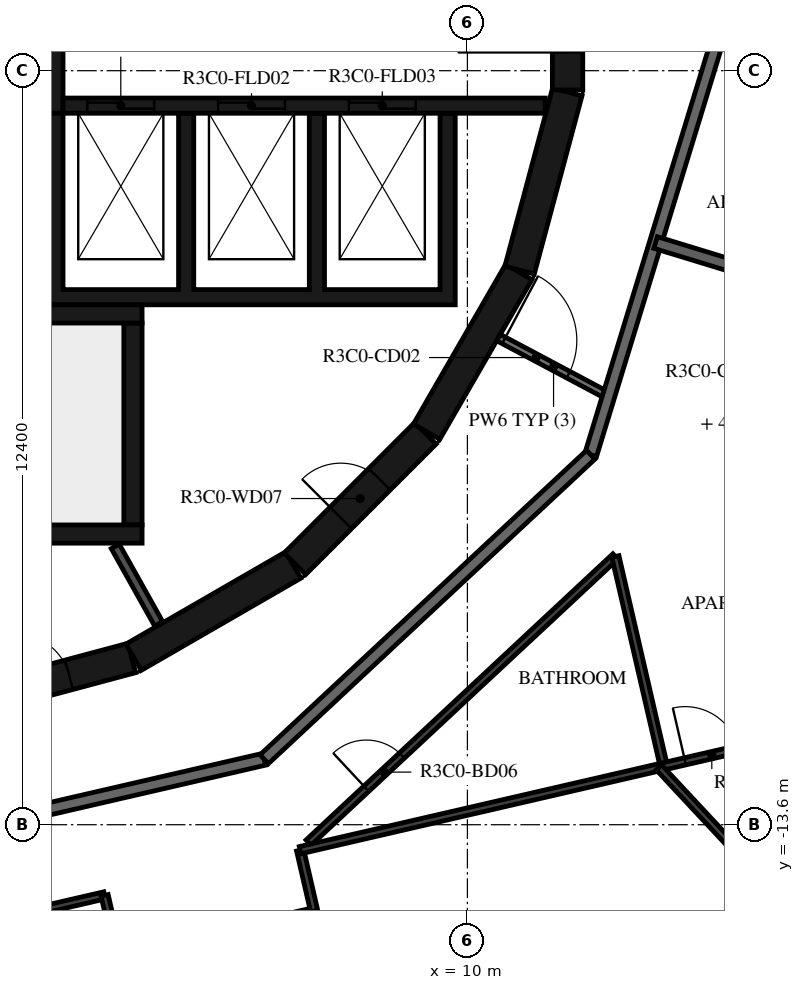
"""IFC4 building model, lengths in metres.
Left out: names, types, materials, properties, quantities, classifications, styles, units other than length and angle.
Written with IfcOpenShell. Run it as: python <this file> out.ifc"""

import sys

from ifc_helpers import new_model, si_unit, direction, frame, frame_2d, origin, place, context, subcontext, project, spatial, polyline, rectangle, outline, extrude, element, fill, save


model = new_model("IFC4")
c1 = context("Model", 3, precision=1e-05, world=origin(), true_north=direction((0.0, 1.0)))
c2 = subcontext(c1, "Body", "Model", "MODEL_VIEW")
j1 = project(units=[si_unit("LENGTHUNIT", "METRE"), si_unit("PLANEANGLEUNIT", "RADIAN")], contexts=[c1])
p1 = place(None, origin())
s1 = spatial("IfcSite", under=j1, at=p1, CompositionType="ELEMENT")
p2 = place(p1, origin())
s2 = spatial("IfcBuilding", under=s1, at=p2, CompositionType="ELEMENT")
p3 = place(p2, frame((0.0, 0.0, 141.4)))
s3 = spatial("IfcBuildingStorey", under=s2, at=p3, CompositionType="ELEMENT", Elevation=141.4)
p4 = place(p3, frame((1.55, -11.643, 0.0), z_axis=(0.0, 0.0, 1.0), x_axis=(0.965948410781, 0.258734743916, 0.0)))
e1 = element("IfcWall", 1, at=p4, inside=s3, PredefinedType="SHEAR", context=c2, shape_type="SweptSolid", body=[
    extrude(rectangle(XDim=3.033, YDim=0.5, at=frame_2d((1.516, 0.0))), origin(), (0.0, 0.0, 1.0), 3.05),
])
p5 = place(p4, frame((1.066, 0.0, 0.0)))
e2 = element("IfcOpeningElement", 2, at=p5, cuts=e1, PredefinedType="OPENING", context=c2, shape_type="SweptSolid", body=[
    extrude(rectangle(XDim=0.9, YDim=2.1, at=frame_2d((0.45, 1.05))), frame((0.0, 0.26, 0.0), z_axis=(0.0, -1.0, 0.0), x_axis=(1.0, 0.0, 0.0)), (0.0, 0.0, 1.0), 0.52),
])
p6 = place(p3, frame((4.51, -10.845, 0.0), z_axis=(0.0, 0.0, 1.0), x_axis=(0.865975092491, 0.500087131594, 0.0)))
e3 = element("IfcWall", 3, at=p6, inside=s3, PredefinedType="SHEAR", context=c2, shape_type="SweptSolid", body=[
    extrude(rectangle(XDim=3.033, YDim=0.5, at=frame_2d((1.516, 0.0))), origin(), (0.0, 0.0, 1.0), 3.05),
])
p7 = place(p3, frame((7.164, -9.308, 0.0), z_axis=(0.0, 0.0, 1.0), x_axis=(0.707106781187, 0.707106781187, 0.0)))
e4 = element("IfcWall", 4, at=p7, inside=s3, PredefinedType="SHEAR", context=c2, shape_type="SweptSolid", body=[
    extrude(rectangle(XDim=3.032, YDim=0.5, at=frame_2d((1.516, 0.0))), origin(), (0.0, 0.0, 1.0), 3.05),
])
p8 = place(p7, frame((1.066, 0.0, 0.0)))
e5 = element("IfcOpeningElement", 5, at=p8, cuts=e4, PredefinedType="OPENING", context=c2, shape_type="SweptSolid", body=[
    extrude(rectangle(XDim=0.9, YDim=2.1, at=frame_2d((0.45, 1.05))), frame((0.0, 0.26, 0.0), z_axis=(0.0, -1.0, 0.0), x_axis=(1.0, 0.0, 0.0)), (0.0, 0.0, 1.0), 0.52),
])
for number, where, z_axis, x_axis in (
    (6, (9.329, -7.137, 0.0), (0.0, 0.0, 1.0), (0.5, 0.866, 0.0)),
    (7, (10.858, -4.479, 0.0), (0.0, 0.0, 1.0), (0.259, 0.966, 0.0)),
):
    element("IfcWall", number, at=place(p3, frame(where, z_axis=z_axis, x_axis=x_axis)), inside=s3, PredefinedType="SHEAR", context=c2, shape_type="SweptSolid", body=[
        extrude(rectangle(XDim=3.033, YDim=0.5, at=frame_2d((1.516, 0.0))), origin(), (0.0, 0.0, 1.0), 3.05),
    ])
p9 = place(p3, frame((11.647, -1.516, 0.0), z_axis=(0.0, 0.0, 1.0), x_axis=(0.0, 1.0, 0.0)))
e8 = element("IfcWall", 8, at=p9, inside=s3, PredefinedType="SHEAR", context=c2, shape_type="SweptSolid", body=[
    extrude(rectangle(XDim=3.033, YDim=0.5, at=frame_2d((1.516, 0.0))), origin(), (0.0, 0.0, 1.0), 3.05),
])
p10 = place(p9, frame((0.616, 0.0, 0.0)))
e9 = element("IfcOpeningElement", 9, at=p10, cuts=e8, PredefinedType="OPENING", context=c2, shape_type="SweptSolid", body=[
    extrude(rectangle(XDim=1.8, YDim=2.1, at=frame_2d((0.9, 1.05))), frame((0.0, 0.26, 0.0), z_axis=(0.0, -1.0, 0.0), x_axis=(1.0, 0.0, 0.0)), (0.0, 0.0, 1.0), 0.52),
])
p11 = place(p3, frame((-2.4, -5.2, 0.0), z_axis=(0.0, 0.0, 1.0), x_axis=(1.0, 0.0, 0.0)))
e10 = element("IfcWall", 10, at=p11, inside=s3, PredefinedType="SHEAR", context=c2, shape_type="SweptSolid", body=[
    extrude(rectangle(XDim=7.05, YDim=0.3, at=frame_2d((3.525, 0.0))), origin(), (0.0, 0.0, 1.0), 3.05),
])
p12 = place(p3, frame((4.5, -8.67, 0.0), z_axis=(0.0, 0.0, 1.0), x_axis=(0.0, 1.0, 0.0)))
e11 = element("IfcWall", 11, at=p12, inside=s3, PredefinedType="SHEAR", context=c2, shape_type="SweptSolid", body=[
    extrude(rectangle(XDim=3.32, YDim=0.3, at=frame_2d((1.66, 0.0))), origin(), (0.0, 0.0, 1.0), 3.05),
])
p13 = place(p3, frame((0.1, -8.82, 0.0), z_axis=(0.0, 0.0, 1.0), x_axis=(1.0, 0.0, 0.0)))
e12 = element("IfcWall", 12, at=p13, inside=s3, PredefinedType="SHEAR", context=c2, shape_type="SweptSolid", body=[
    extrude(rectangle(XDim=4.55, YDim=0.3, at=frame_2d((2.275, 0.0))), origin(), (0.0, 0.0, 1.0), 3.05),
])
p14 = place(p3, origin())
e13 = element("IfcWall", 13, at=p14, inside=s3, PredefinedType="SHEAR", context=c2, shape_type="SweptSolid", body=[
    extrude(outline(polyline([(9.8, -5.05), (9.8, -4.8), (9.8, -1.9), (9.55, -1.9), (9.55, -4.8), (7.65, -4.8), (7.65, -1.9), (7.4, -1.9), (7.4, -4.8), (5.5, -4.8), (5.5, -1.9), (5.25, -1.9), (5.25, -4.8), (3.35, -4.8), (3.35, -1.9), (3.1, -1.9), (3.1, -4.8), (-5.25, -4.8), (-5.25, -1.9), (-5.5, -1.9), (-5.5, -4.8), (-7.4, -4.8), (-7.4, -1.9), (-7.65, -1.9), (-7.65, -4.8), (-9.55, -4.8), (-9.55, -1.9), (-9.8, -1.9), (-9.8, -4.8), (-9.8, -5.05), (9.8, -5.05)])), origin(), (0.0, 0.0, 1.0), 3.05),
])
p15 = place(p3, frame((3.35, -1.775, 0.0), z_axis=(0.0, 0.0, 1.0), x_axis=(1.0, 0.0, 0.0)))
e14 = element("IfcWall", 14, at=p15, inside=s3, PredefinedType="SHEAR", context=c2, shape_type="SweptSolid", body=[
    extrude(rectangle(XDim=7.93, YDim=0.25, at=frame_2d((3.965, 0.0))), origin(), (0.0, 0.0, 1.0), 3.05),
])
p16 = place(p15, frame((0.4, 0.0, 0.0)))
e15 = element("IfcOpeningElement", 15, at=p16, cuts=e14, PredefinedType="OPENING", context=c2, shape_type="SweptSolid", body=[
    extrude(rectangle(XDim=1.1, YDim=2.4, at=frame_2d((0.55, 1.2))), frame((0.0, 0.135, 0.0), z_axis=(0.0, -1.0, 0.0), x_axis=(1.0, 0.0, 0.0)), (0.0, 0.0, 1.0), 0.27),
])
p17 = place(p15, frame((2.55, 0.0, 0.0)))
e16 = element("IfcOpeningElement", 16, at=p17, cuts=e14, PredefinedType="OPENING", context=c2, shape_type="SweptSolid", body=[
    extrude(rectangle(XDim=1.1, YDim=2.4, at=frame_2d((0.55, 1.2))), frame((0.0, 0.135, 0.0), z_axis=(0.0, -1.0, 0.0), x_axis=(1.0, 0.0, 0.0)), (0.0, 0.0, 1.0), 0.27),
])
p18 = place(p15, frame((4.7, 0.0, 0.0)))
e17 = element("IfcOpeningElement", 17, at=p18, cuts=e14, PredefinedType="OPENING", context=c2, shape_type="SweptSolid", body=[
    extrude(rectangle(XDim=1.1, YDim=2.4, at=frame_2d((0.55, 1.2))), frame((0.0, 0.135, 0.0), z_axis=(0.0, -1.0, 0.0), x_axis=(1.0, 0.0, 0.0)), (0.0, 0.0, 1.0), 0.27),
])
p19 = place(p3, frame((3.225, -1.9, 0.0), z_axis=(0.0, 0.0, 1.0), x_axis=(0.0, 1.0, 0.0)))
e18 = element("IfcWall", 18, at=p19, inside=s3, PredefinedType="SHEAR", context=c2, shape_type="SweptSolid", body=[
    extrude(rectangle(XDim=3.8, YDim=0.25, at=frame_2d((1.9, 0.0))), origin(), (0.0, 0.0, 1.0), 3.05),
])
p20 = place(p3, frame((4.922, -10.296, 0.0), z_axis=(0.0, 0.0, 1.0), x_axis=(-0.48860846254, 0.872503163509, 0.0)))
e19 = element("IfcWall", 19, at=p20, inside=s3, PredefinedType="PARTITIONING", context=c2, shape_type="SweptSolid", body=[
    extrude(rectangle(XDim=1.459, YDim=0.15, at=frame_2d((0.73, 0.0))), origin(), (0.0, 0.0, 1.0), 3.05),
])
p21 = place(p3, frame((10.511, -5.589, 0.0), z_axis=(0.0, 0.0, 1.0), x_axis=(0.882987820808, -0.469395897196, 0.0)))
e20 = element("IfcWall", 20, at=p21, inside=s3, PredefinedType="PARTITIONING", context=c2, shape_type="SweptSolid", body=[
    extrude(rectangle(XDim=2.052, YDim=0.12, at=frame_2d((1.026, 0.0))), origin(), (0.0, 0.0, 1.0), 3.05),
])
p22 = place(p21, frame((0.1, 0.0, 0.0)))
e21 = element("IfcOpeningElement", 21, at=p22, cuts=e20, PredefinedType="OPENING", context=c2, shape_type="SweptSolid", body=[
    extrude(rectangle(XDim=1.2, YDim=2.1, at=frame_2d((0.6, 1.05))), frame((0.0, 0.07, 0.0), z_axis=(0.0, -1.0, 0.0), x_axis=(1.0, 0.0, 0.0)), (0.0, 0.0, 1.0), 0.14),
])
p23 = place(p3, frame((12.028, -7.516, 0.0), z_axis=(0.0, 0.0, 1.0), x_axis=(0.292365533182, 0.956306642771, 0.0)))
e22 = element("IfcWall", 22, at=p23, inside=s3, PredefinedType="STANDARD", context=c2, shape_type="SweptSolid", body=[
    extrude(rectangle(XDim=7.342, YDim=0.2, at=frame_2d((3.671, 0.0))), origin(), (0.0, 0.0, 1.0), 3.05),
])
p24 = place(p3, frame((-0.495, -14.175, 0.0), z_axis=(0.0, 0.0, 1.0), x_axis=(0.974376622151, 0.224922649383, 0.0)))
e23 = element("IfcWall", 23, at=p24, inside=s3, PredefinedType="STANDARD", context=c2, shape_type="SweptSolid", body=[
    extrude(rectangle(XDim=7.342, YDim=0.2, at=frame_2d((3.671, 0.0))), origin(), (0.0, 0.0, 1.0), 3.05),
])
p25 = place(p24, frame((0.2, 0.0, 0.0)))
e24 = element("IfcOpeningElement", 24, at=p25, cuts=e23, PredefinedType="OPENING", context=c2, shape_type="SweptSolid", body=[
    extrude(rectangle(XDim=1.0, YDim=2.1, at=frame_2d((0.5, 1.05))), frame((0.0, 0.11, 0.0), z_axis=(0.0, -1.0, 0.0), x_axis=(1.0, 0.0, 0.0)), (0.0, 0.0, 1.0), 0.22),
])
p26 = place(p3, frame((6.659, -12.523, 0.0), z_axis=(0.0, 0.0, 1.0), x_axis=(0.731350455479, 0.682001841105, 0.0)))
e25 = element("IfcWall", 25, at=p26, inside=s3, PredefinedType="STANDARD", context=c2, shape_type="SweptSolid", body=[
    extrude(rectangle(XDim=7.342, YDim=0.2, at=frame_2d((3.671, 0.0))), origin(), (0.0, 0.0, 1.0), 3.05),
])
p27 = place(p3, frame((13.095, -4.026, 0.0), z_axis=(0.0, 0.0, 1.0), x_axis=(0.956303942966, -0.292374363904, 0.0)))
e26 = element("IfcWall", 26, at=p27, inside=s3, PredefinedType="STANDARD", context=c2, shape_type="SweptSolid", body=[
    extrude(rectangle(XDim=6.567, YDim=0.2, at=frame_2d((3.284, 0.0))), origin(), (0.0, 0.0, 1.0), 3.05),
])
p28 = place(p3, frame((-14.736, -19.095, 0.0), z_axis=(0.0, 0.0, 1.0), x_axis=(0.974368335243, 0.224958545682, 0.0)))
e27 = element("IfcWall", 27, at=p28, inside=s3, PredefinedType="PARTITIONING", context=c2, shape_type="SweptSolid", body=[
    extrude(rectangle(XDim=19.263, YDim=0.12, at=frame_2d((9.632, 0.0))), origin(), (0.0, 0.0, 1.0), 3.05),
])
p29 = place(p28, frame((2.993, 0.0, 0.0)))
e28 = element("IfcOpeningElement", 28, at=p29, cuts=e27, PredefinedType="OPENING", context=c2, shape_type="SweptSolid", body=[
    extrude(rectangle(XDim=0.9, YDim=2.1, at=frame_2d((0.45, 1.05))), frame((0.0, 0.07, 0.0), z_axis=(0.0, -1.0, 0.0), x_axis=(1.0, 0.0, 0.0)), (0.0, 0.0, 1.0), 0.14),
])
p30 = place(p28, frame((6.81, 0.0, 0.0)))
e29 = element("IfcOpeningElement", 29, at=p30, cuts=e27, PredefinedType="OPENING", context=c2, shape_type="SweptSolid", body=[
    extrude(rectangle(XDim=0.9, YDim=2.1, at=frame_2d((0.45, 1.05))), frame((0.0, 0.07, 0.0), z_axis=(0.0, -1.0, 0.0), x_axis=(1.0, 0.0, 0.0)), (0.0, 0.0, 1.0), 0.14),
])
p31 = place(p28, frame((0.2, 0.0, 0.0)))
e30 = element("IfcOpeningElement", 30, at=p31, cuts=e27, PredefinedType="OPENING", context=c2, shape_type="SweptSolid", body=[
    extrude(rectangle(XDim=0.9, YDim=2.1, at=frame_2d((0.45, 1.05))), frame((0.0, 0.07, 0.0), z_axis=(0.0, -1.0, 0.0), x_axis=(1.0, 0.0, 0.0)), (0.0, 0.0, 1.0), 0.14),
])
p32 = place(p28, frame((14.839, 0.0, 0.0)))
e31 = element("IfcOpeningElement", 31, at=p32, cuts=e27, PredefinedType="OPENING", context=c2, shape_type="SweptSolid", body=[
    extrude(rectangle(XDim=0.9, YDim=2.1, at=frame_2d((0.45, 1.05))), frame((0.0, 0.07, 0.0), z_axis=(0.0, -1.0, 0.0), x_axis=(1.0, 0.0, 0.0)), (0.0, 0.0, 1.0), 0.14),
])
p33 = place(p3, frame((4.034, -14.762, 0.0), z_axis=(0.0, 0.0, 1.0), x_axis=(0.224859506699, -0.974391195695, 0.0)))
e32 = element("IfcWall", 32, at=p33, inside=s3, PredefinedType="PARTITIONING", context=c2, shape_type="SweptSolid", body=[
    extrude(rectangle(XDim=1.029, YDim=0.12, at=frame_2d((0.515, 0.0))), origin(), (0.0, 0.0, 1.0), 3.05),
])
p34 = place(p3, frame((4.265, -15.765, 0.0), z_axis=(0.0, 0.0, 1.0), x_axis=(0.974382467056, 0.22489732745, 0.0)))
e33 = element("IfcWall", 33, at=p34, inside=s3, PredefinedType="PARTITIONING", context=c2, shape_type="SweptSolid", body=[
    extrude(rectangle(XDim=3.3, YDim=0.12, at=frame_2d((1.65, 0.0))), origin(), (0.0, 0.0, 1.0), 3.05),
])
p35 = place(p3, frame((7.481, -15.022, 0.0), z_axis=(0.0, 0.0, 1.0), x_axis=(-0.225084689316, 0.974339203068, 0.0)))
e34 = element("IfcWall", 34, at=p35, inside=s3, PredefinedType="PARTITIONING", context=c2, shape_type="SweptSolid", body=[
    extrude(rectangle(XDim=1.029, YDim=0.12, at=frame_2d((0.515, 0.0))), origin(), (0.0, 0.0, 1.0), 3.05),
])
p36 = place(p3, frame((7.388, -13.894, 0.0), z_axis=(0.0, 0.0, 1.0), x_axis=(0.731339966659, 0.682013088707, 0.0)))
e35 = element("IfcWall", 35, at=p36, inside=s3, PredefinedType="PARTITIONING", context=c2, shape_type="SweptSolid", body=[
    extrude(rectangle(XDim=6.899, YDim=0.12, at=frame_2d((3.45, 0.0))), origin(), (0.0, 0.0, 1.0), 3.05),
])
p37 = place(p36, frame((1.3, 0.0, 0.0)))
e36 = element("IfcOpeningElement", 36, at=p37, cuts=e35, PredefinedType="OPENING", context=c2, shape_type="SweptSolid", body=[
    extrude(rectangle(XDim=0.8, YDim=2.1, at=frame_2d((0.4, 1.05))), frame((0.0, 0.07, 0.0), z_axis=(0.0, -1.0, 0.0), x_axis=(1.0, 0.0, 0.0)), (0.0, 0.0, 1.0), 0.14),
])
p38 = place(p3, frame((12.434, -9.189, 0.0), z_axis=(0.0, 0.0, 1.0), x_axis=(0.224924972887, -0.974376085796, 0.0)))
e37 = element("IfcWall", 37, at=p38, inside=s3, PredefinedType="PARTITIONING", context=c2, shape_type="SweptSolid", body=[
    extrude(rectangle(XDim=3.541, YDim=0.12, at=frame_2d((1.771, 0.0))), origin(), (0.0, 0.0, 1.0), 3.05),
])
p39 = place(p3, frame((7.249, -14.02, 0.0), z_axis=(0.0, 0.0, 1.0), x_axis=(0.974369514697, 0.224953437023, 0.0)))
e38 = element("IfcWall", 38, at=p39, inside=s3, PredefinedType="PARTITIONING", context=c2, shape_type="SweptSolid", body=[
    extrude(rectangle(XDim=12.149, YDim=0.12, at=frame_2d((6.074, 0.0))), origin(), (0.0, 0.0, 1.0), 3.05),
])
p40 = place(p39, frame((6.498, 0.0, 0.0)))
e39 = element("IfcOpeningElement", 39, at=p40, cuts=e38, PredefinedType="OPENING", context=c2, shape_type="SweptSolid", body=[
    extrude(rectangle(XDim=0.9, YDim=2.1, at=frame_2d((0.45, 1.05))), frame((0.0, 0.07, 0.0), z_axis=(0.0, -1.0, 0.0), x_axis=(1.0, 0.0, 0.0)), (0.0, 0.0, 1.0), 0.14),
])
p41 = place(p3, frame((15.985, -15.698, 0.0), z_axis=(0.0, 0.0, 1.0), x_axis=(-0.681979185924, 0.731371581322, 0.0)))
e40 = element("IfcWall", 40, at=p41, inside=s3, PredefinedType="PARTITIONING", context=c2, shape_type="SweptSolid", body=[
    extrude(rectangle(XDim=4.157, YDim=0.12, at=frame_2d((2.079, 0.0))), origin(), (0.0, 0.0, 1.0), 3.05),
])
p42 = place(p10, origin())
e41 = element("IfcDoor", 41, at=p42, inside=s3, OperationType="DOUBLE_DOOR_SINGLE_SWING", PredefinedType="DOOR", context=c2, shape_type="SweptSolid", body=[
    extrude(rectangle(XDim=1.8, YDim=2.1, at=frame_2d((0.9, 1.05))), frame((0.0, 0.025, 0.0), z_axis=(0.0, -1.0, 0.0), x_axis=(1.0, 0.0, 0.0)), (0.0, 0.0, 1.0), 0.05),
])
fill(e9, e41)
p43 = place(p16, origin())
e42 = element("IfcDoor", 42, at=p43, inside=s3, OperationType="DOUBLE_DOOR_SLIDING", PredefinedType="DOOR", context=c2, shape_type="SweptSolid", body=[
    extrude(rectangle(XDim=1.1, YDim=2.4, at=frame_2d((0.55, 1.2))), frame((0.0, 0.025, 0.0), z_axis=(0.0, -1.0, 0.0), x_axis=(1.0, 0.0, 0.0)), (0.0, 0.0, 1.0), 0.05),
])
fill(e15, e42)
p44 = place(p17, origin())
e43 = element("IfcDoor", 43, at=p44, inside=s3, OperationType="DOUBLE_DOOR_SLIDING", PredefinedType="DOOR", context=c2, shape_type="SweptSolid", body=[
    extrude(rectangle(XDim=1.1, YDim=2.4, at=frame_2d((0.55, 1.2))), frame((0.0, 0.025, 0.0), z_axis=(0.0, -1.0, 0.0), x_axis=(1.0, 0.0, 0.0)), (0.0, 0.0, 1.0), 0.05),
])
fill(e16, e43)
p45 = place(p18, origin())
e44 = element("IfcDoor", 44, at=p45, inside=s3, OperationType="DOUBLE_DOOR_SLIDING", PredefinedType="DOOR", context=c2, shape_type="SweptSolid", body=[
    extrude(rectangle(XDim=1.1, YDim=2.4, at=frame_2d((0.55, 1.2))), frame((0.0, 0.025, 0.0), z_axis=(0.0, -1.0, 0.0), x_axis=(1.0, 0.0, 0.0)), (0.0, 0.0, 1.0), 0.05),
])
fill(e17, e44)
p46 = place(p8, origin())
e45 = element("IfcDoor", 45, at=p46, inside=s3, OperationType="SINGLE_SWING_RIGHT", PredefinedType="DOOR", context=c2, shape_type="SweptSolid", body=[
    extrude(rectangle(XDim=0.9, YDim=2.1, at=frame_2d((0.45, 1.05))), frame((0.0, 0.025, 0.0), z_axis=(0.0, -1.0, 0.0), x_axis=(1.0, 0.0, 0.0)), (0.0, 0.0, 1.0), 0.05),
])
fill(e5, e45)
p47 = place(p5, origin())
e46 = element("IfcDoor", 46, at=p47, inside=s3, OperationType="SINGLE_SWING_LEFT", PredefinedType="DOOR", context=c2, shape_type="SweptSolid", body=[
    extrude(rectangle(XDim=0.9, YDim=2.1, at=frame_2d((0.45, 1.05))), frame((0.0, 0.025, 0.0), z_axis=(0.0, -1.0, 0.0), x_axis=(1.0, 0.0, 0.0)), (0.0, 0.0, 1.0), 0.05),
])
fill(e2, e46)
p48 = place(p37, origin())
e47 = element("IfcDoor", 47, at=p48, inside=s3, OperationType="SINGLE_SWING_RIGHT", PredefinedType="DOOR", context=c2, shape_type="SweptSolid", body=[
    extrude(rectangle(XDim=0.8, YDim=2.1, at=frame_2d((0.4, 1.05))), frame((0.0, 0.025, 0.0), z_axis=(0.0, -1.0, 0.0), x_axis=(1.0, 0.0, 0.0)), (0.0, 0.0, 1.0), 0.05),
])
fill(e36, e47)
p49 = place(p40, origin())
e48 = element("IfcDoor", 48, at=p49, inside=s3, OperationType="SINGLE_SWING_RIGHT", PredefinedType="DOOR", context=c2, shape_type="SweptSolid", body=[
    extrude(rectangle(XDim=0.9, YDim=2.1, at=frame_2d((0.45, 1.05))), frame((0.0, 0.025, 0.0), z_axis=(0.0, -1.0, 0.0), x_axis=(1.0, 0.0, 0.0)), (0.0, 0.0, 1.0), 0.05),
])
fill(e39, e48)
p50 = place(p22, origin())
e49 = element("IfcDoor", 49, at=p50, inside=s3, OperationType="DOUBLE_DOOR_SINGLE_SWING", PredefinedType="DOOR", context=c2, shape_type="SweptSolid", body=[
    extrude(rectangle(XDim=1.2, YDim=2.1, at=frame_2d((0.6, 1.05))), frame((0.0, 0.025, 0.0), z_axis=(0.0, -1.0, 0.0), x_axis=(1.0, 0.0, 0.0)), (0.0, 0.0, 1.0), 0.05),
])
fill(e21, e49)
save(model, sys.argv[1])
